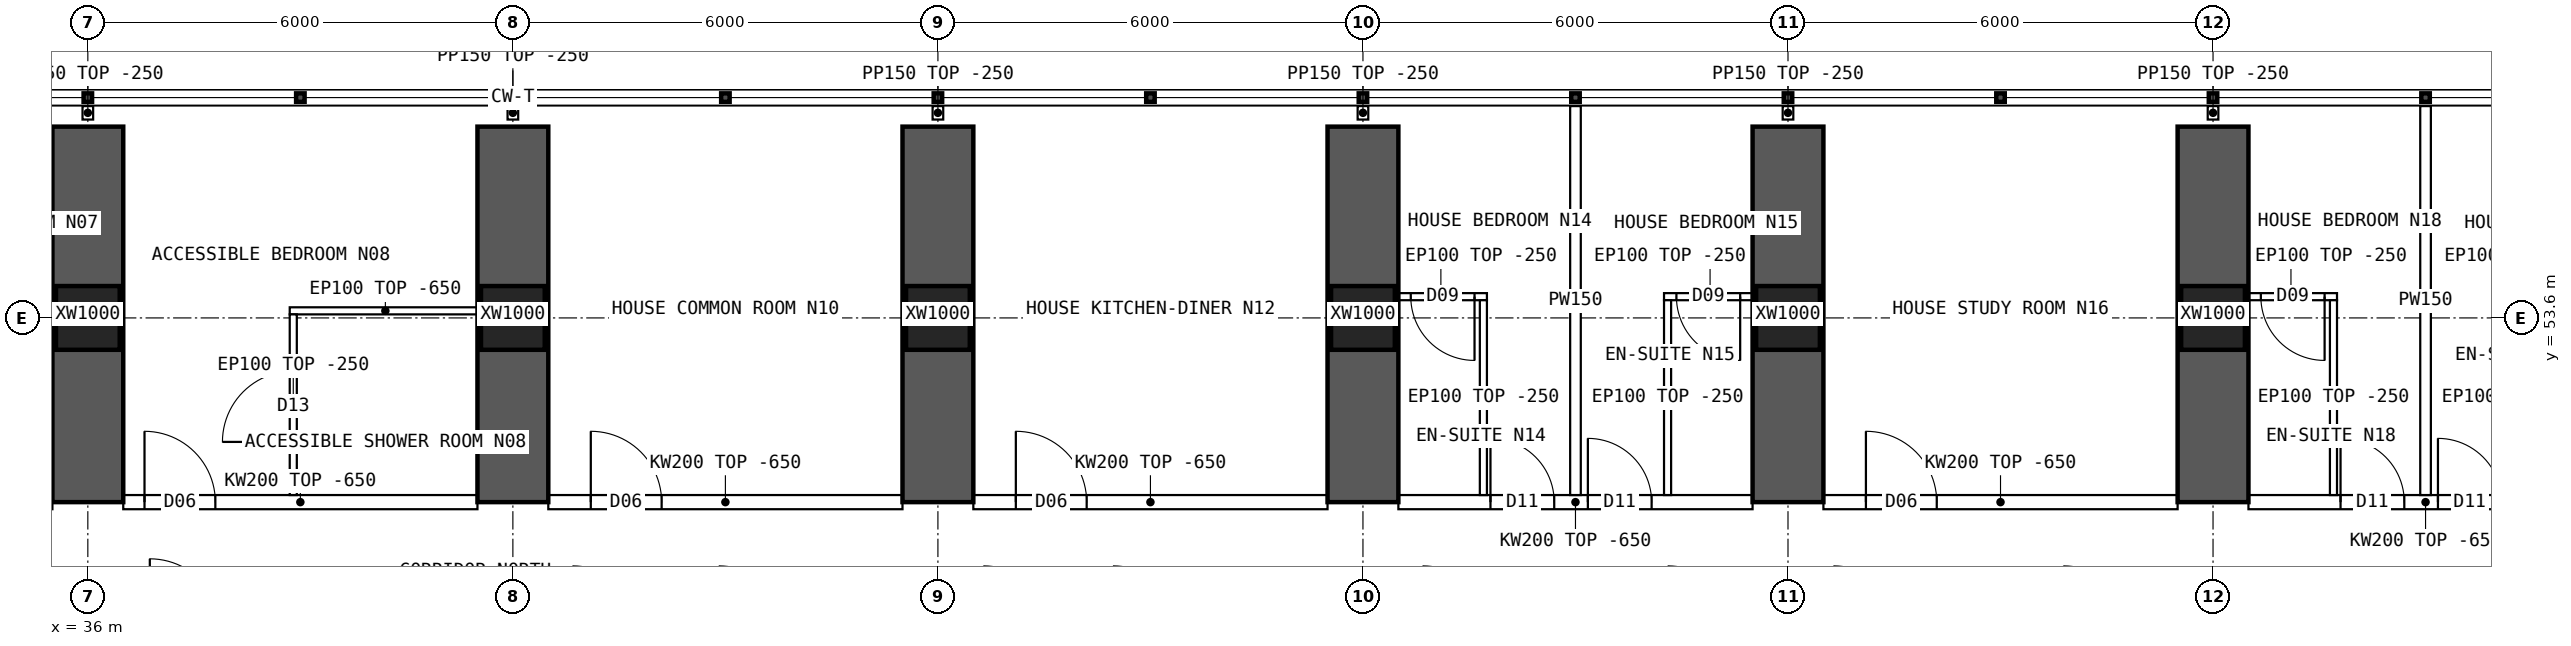
"""IFC4 building model, lengths in metres.
Left out: names, types, materials, properties, quantities, classifications, styles, units other than length and angle.
Written with IfcOpenShell. Run it as: python <this file> out.ifc"""

import sys

from ifc_helpers import new_model, si_unit, direction, frame, frame_2d, origin, origin_2d, place, context, subcontext, project, spatial, polyline, rectangle, hollow_rectangle, outline, extrude, element, fill, save


model = new_model("IFC4")
c1 = context("Model", 3, precision=1e-05, world=origin(), true_north=direction((0.0, 1.0)))
c2 = subcontext(c1, "Body", "Model", "MODEL_VIEW")
j1 = project(units=[si_unit("LENGTHUNIT", "METRE"), si_unit("PLANEANGLEUNIT", "RADIAN")], contexts=[c1])
p1 = place(None, origin())
s1 = spatial("IfcSite", under=j1, at=p1, CompositionType="ELEMENT")
p2 = place(p1, origin())
s2 = spatial("IfcBuilding", under=s1, at=p2, CompositionType="ELEMENT")
p3 = place(p2, frame((0.0, 0.0, 42.7)))
s3 = spatial("IfcBuildingStorey", under=s2, at=p3, CompositionType="ELEMENT", Elevation=42.7)
for number, where, z_axis, x_axis in (
    (1, (36.0, 53.6, 0.0), (0.0, 0.0, 1.0), (1.0, 0.0, 0.0)),
    (2, (42.0, 53.6, 0.0), (0.0, 0.0, 1.0), (1.0, 0.0, 0.0)),
    (3, (48.0, 53.6, 0.0), (0.0, 0.0, 1.0), (1.0, 0.0, 0.0)),
    (4, (54.0, 53.6, 0.0), (0.0, 0.0, 1.0), (1.0, 0.0, 0.0)),
    (5, (60.0, 53.6, 0.0), (0.0, 0.0, 1.0), (1.0, 0.0, 0.0)),
    (6, (66.0, 53.6, 0.0), (0.0, 0.0, 1.0), (1.0, 0.0, 0.0)),
):
    element("IfcColumn", number, at=place(p3, frame(where, z_axis=z_axis, x_axis=x_axis)), inside=s3, PredefinedType="COLUMN", context=c2, shape_type="SweptSolid", body=[
        extrude(hollow_rectangle(XDim=0.9, YDim=0.9, WallThickness=0.09, at=origin_2d()), origin(), (0.0, 0.0, 1.0), 3.75),
    ])
for number, where, z_axis, x_axis in (
    (7, (36.0, 51.0, 0.0), (0.0, 0.0, 1.0), (0.0, 1.0, 0.0)),
    (8, (42.0, 51.0, 0.0), (0.0, 0.0, 1.0), (0.0, 1.0, 0.0)),
    (9, (48.0, 51.0, 0.0), (0.0, 0.0, 1.0), (0.0, 1.0, 0.0)),
    (10, (54.0, 51.0, 0.0), (0.0, 0.0, 1.0), (0.0, 1.0, 0.0)),
    (11, (60.0, 51.0, 0.0), (0.0, 0.0, 1.0), (0.0, 1.0, 0.0)),
    (12, (66.0, 51.0, 0.0), (0.0, 0.0, 1.0), (0.0, 1.0, 0.0)),
):
    element("IfcWall", number, at=place(p3, frame(where, z_axis=z_axis, x_axis=x_axis)), inside=s3, PredefinedType="SHEAR", context=c2, shape_type="SweptSolid", body=[
        extrude(rectangle(XDim=5.3, YDim=1.0, at=frame_2d((2.65, 0.0))), origin(), (0.0, 0.0, 1.0), 3.75),
    ])
p4 = place(p3, frame((36.5, 51.0, 0.0), z_axis=(0.0, 0.0, 1.0), x_axis=(1.0, 0.0, 0.0)))
e13 = element("IfcWall", 13, at=p4, inside=s3, PredefinedType="SOLIDWALL", context=c2, shape_type="SweptSolid", body=[
    extrude(outline(polyline([(0.0, 0.0), (5.0, 0.0), (5.0, 3.1), (0.0, 3.1), (0.0, 0.0)])), frame((0.0, 0.1, 0.0), z_axis=(0.0, -1.0, 0.0), x_axis=(1.0, 0.0, 0.0)), (0.0, 0.0, 1.0), 0.2),
])
p5 = place(p4, frame((0.3, 0.0, 0.0)))
e14 = element("IfcOpeningElement", 14, at=p5, cuts=e13, PredefinedType="OPENING", context=c2, shape_type="SweptSolid", body=[
    extrude(rectangle(XDim=1.0, YDim=2.1, at=frame_2d((0.5, 1.05))), frame((0.0, 0.11, 0.0), z_axis=(0.0, -1.0, 0.0), x_axis=(1.0, 0.0, 0.0)), (0.0, 0.0, 1.0), 0.22),
])
p6 = place(p3, frame((42.5, 51.0, 0.0), z_axis=(0.0, 0.0, 1.0), x_axis=(1.0, 0.0, 0.0)))
e15 = element("IfcWall", 15, at=p6, inside=s3, PredefinedType="SOLIDWALL", context=c2, shape_type="SweptSolid", body=[
    extrude(outline(polyline([(0.0, 0.0), (5.0, 0.0), (5.0, 3.1), (0.0, 3.1), (0.0, 0.0)])), frame((0.0, 0.1, 0.0), z_axis=(0.0, -1.0, 0.0), x_axis=(1.0, 0.0, 0.0)), (0.0, 0.0, 1.0), 0.2),
])
p7 = place(p6, frame((0.6, 0.0, 0.0)))
e16 = element("IfcOpeningElement", 16, at=p7, cuts=e15, PredefinedType="OPENING", context=c2, shape_type="SweptSolid", body=[
    extrude(rectangle(XDim=1.0, YDim=2.1, at=frame_2d((0.5, 1.05))), frame((0.0, 0.11, 0.0), z_axis=(0.0, -1.0, 0.0), x_axis=(1.0, 0.0, 0.0)), (0.0, 0.0, 1.0), 0.22),
])
p8 = place(p3, frame((48.5, 51.0, 0.0), z_axis=(0.0, 0.0, 1.0), x_axis=(1.0, 0.0, 0.0)))
e17 = element("IfcWall", 17, at=p8, inside=s3, PredefinedType="SOLIDWALL", context=c2, shape_type="SweptSolid", body=[
    extrude(outline(polyline([(0.0, 0.0), (5.0, 0.0), (5.0, 3.1), (0.0, 3.1), (0.0, 0.0)])), frame((0.0, 0.1, 0.0), z_axis=(0.0, -1.0, 0.0), x_axis=(1.0, 0.0, 0.0)), (0.0, 0.0, 1.0), 0.2),
])
p9 = place(p8, frame((0.6, 0.0, 0.0)))
e18 = element("IfcOpeningElement", 18, at=p9, cuts=e17, PredefinedType="OPENING", context=c2, shape_type="SweptSolid", body=[
    extrude(rectangle(XDim=1.0, YDim=2.1, at=frame_2d((0.5, 1.05))), frame((0.0, 0.11, 0.0), z_axis=(0.0, -1.0, 0.0), x_axis=(1.0, 0.0, 0.0)), (0.0, 0.0, 1.0), 0.22),
])
p10 = place(p3, frame((54.5, 51.0, 0.0), z_axis=(0.0, 0.0, 1.0), x_axis=(1.0, 0.0, 0.0)))
e19 = element("IfcWall", 19, at=p10, inside=s3, PredefinedType="SOLIDWALL", context=c2, shape_type="SweptSolid", body=[
    extrude(outline(polyline([(0.0, 0.0), (5.0, 0.0), (5.0, 3.1), (0.0, 3.1), (0.0, 0.0)])), frame((0.0, 0.1, 0.0), z_axis=(0.0, -1.0, 0.0), x_axis=(1.0, 0.0, 0.0)), (0.0, 0.0, 1.0), 0.2),
])
p11 = place(p10, frame((1.3, 0.0, 0.0)))
e20 = element("IfcOpeningElement", 20, at=p11, cuts=e19, PredefinedType="OPENING", context=c2, shape_type="SweptSolid", body=[
    extrude(rectangle(XDim=0.9, YDim=2.1, at=frame_2d((0.45, 1.05))), frame((0.0, 0.11, 0.0), z_axis=(0.0, -1.0, 0.0), x_axis=(1.0, 0.0, 0.0)), (0.0, 0.0, 1.0), 0.22),
])
p12 = place(p10, frame((2.675, 0.0, 0.0)))
e21 = element("IfcOpeningElement", 21, at=p12, cuts=e19, PredefinedType="OPENING", context=c2, shape_type="SweptSolid", body=[
    extrude(rectangle(XDim=0.9, YDim=2.1, at=frame_2d((0.45, 1.05))), frame((0.0, 0.11, 0.0), z_axis=(0.0, -1.0, 0.0), x_axis=(1.0, 0.0, 0.0)), (0.0, 0.0, 1.0), 0.22),
])
p13 = place(p3, frame((60.5, 51.0, 0.0), z_axis=(0.0, 0.0, 1.0), x_axis=(1.0, 0.0, 0.0)))
e22 = element("IfcWall", 22, at=p13, inside=s3, PredefinedType="SOLIDWALL", context=c2, shape_type="SweptSolid", body=[
    extrude(outline(polyline([(0.0, 0.0), (5.0, 0.0), (5.0, 3.1), (0.0, 3.1), (0.0, 0.0)])), frame((0.0, 0.1, 0.0), z_axis=(0.0, -1.0, 0.0), x_axis=(1.0, 0.0, 0.0)), (0.0, 0.0, 1.0), 0.2),
])
p14 = place(p13, frame((0.6, 0.0, 0.0)))
e23 = element("IfcOpeningElement", 23, at=p14, cuts=e22, PredefinedType="OPENING", context=c2, shape_type="SweptSolid", body=[
    extrude(rectangle(XDim=1.0, YDim=2.1, at=frame_2d((0.5, 1.05))), frame((0.0, 0.11, 0.0), z_axis=(0.0, -1.0, 0.0), x_axis=(1.0, 0.0, 0.0)), (0.0, 0.0, 1.0), 0.22),
])
p15 = place(p3, frame((66.5, 51.0, 0.0), z_axis=(0.0, 0.0, 1.0), x_axis=(1.0, 0.0, 0.0)))
e24 = element("IfcWall", 24, at=p15, inside=s3, PredefinedType="SOLIDWALL", context=c2, shape_type="SweptSolid", body=[
    extrude(outline(polyline([(0.0, 0.0), (5.0, 0.0), (5.0, 3.1), (0.0, 3.1), (0.0, 0.0)])), frame((0.0, 0.1, 0.0), z_axis=(0.0, -1.0, 0.0), x_axis=(1.0, 0.0, 0.0)), (0.0, 0.0, 1.0), 0.2),
])
p16 = place(p15, frame((1.3, 0.0, 0.0)))
e25 = element("IfcOpeningElement", 25, at=p16, cuts=e24, PredefinedType="OPENING", context=c2, shape_type="SweptSolid", body=[
    extrude(rectangle(XDim=0.9, YDim=2.1, at=frame_2d((0.45, 1.05))), frame((0.0, 0.11, 0.0), z_axis=(0.0, -1.0, 0.0), x_axis=(1.0, 0.0, 0.0)), (0.0, 0.0, 1.0), 0.22),
])
p17 = place(p15, frame((2.675, 0.0, 0.0)))
e26 = element("IfcOpeningElement", 26, at=p17, cuts=e24, PredefinedType="OPENING", context=c2, shape_type="SweptSolid", body=[
    extrude(rectangle(XDim=0.9, YDim=2.1, at=frame_2d((0.45, 1.05))), frame((0.0, 0.11, 0.0), z_axis=(0.0, -1.0, 0.0), x_axis=(1.0, 0.0, 0.0)), (0.0, 0.0, 1.0), 0.22),
])
p18 = place(p3, frame((34.25, 53.9, 0.0), z_axis=(0.0, 0.0, 1.0), x_axis=(1.0, 0.0, 0.0)))
e27 = element("IfcWall", 27, at=p18, inside=s3, PredefinedType="PARTITIONING", context=c2, shape_type="SweptSolid", body=[
    extrude(rectangle(XDim=1.3, YDim=0.1, at=frame_2d((0.65, 0.0))), origin(), (0.0, 0.0, 1.0), 3.5),
])
p19 = place(p18, frame((0.175, 0.0, 0.0)))
e28 = element("IfcOpeningElement", 28, at=p19, cuts=e27, PredefinedType="OPENING", context=c2, shape_type="SweptSolid", body=[
    extrude(rectangle(XDim=0.9, YDim=2.1, at=frame_2d((0.45, 1.05))), frame((0.0, 0.06, 0.0), z_axis=(0.0, -1.0, 0.0), x_axis=(1.0, 0.0, 0.0)), (0.0, 0.0, 1.0), 0.12),
])
p20 = place(p3, frame((38.85, 53.7, 0.0), z_axis=(0.0, 0.0, 1.0), x_axis=(1.0, 0.0, 0.0)))
e29 = element("IfcWall", 29, at=p20, inside=s3, PredefinedType="PARTITIONING", context=c2, shape_type="SweptSolid", body=[
    extrude(outline(polyline([(0.0, 0.0), (2.7, 0.0), (2.7, 3.1), (0.0, 3.1), (0.0, 0.0)])), frame((0.0, 0.05, 0.0), z_axis=(0.0, -1.0, 0.0), x_axis=(1.0, 0.0, 0.0)), (0.0, 0.0, 1.0), 0.1),
])
p21 = place(p3, frame((38.9, 53.65, 0.0), z_axis=(0.0, 0.0, 1.0), x_axis=(0.0, -1.0, 0.0)))
e30 = element("IfcWall", 30, at=p21, inside=s3, PredefinedType="PARTITIONING", context=c2, shape_type="SweptSolid", body=[
    extrude(outline(polyline([(0.0, 0.0), (2.55, 0.0), (2.55, 3.1), (2.502, 3.1), (2.5, 3.5), (0.252, 3.5), (0.25, 3.1), (0.0, 3.1), (0.0, 0.0)])), frame((0.0, 0.05, 0.0), z_axis=(0.0, -1.0, 0.0), x_axis=(1.0, 0.0, 0.0)), (0.0, 0.0, 1.0), 0.1),
])
p22 = place(p21, frame((0.8, 0.0, 0.0)))
e31 = element("IfcOpeningElement", 31, at=p22, cuts=e30, PredefinedType="OPENING", context=c2, shape_type="SweptSolid", body=[
    extrude(rectangle(XDim=1.0, YDim=2.1, at=frame_2d((0.5, 1.05))), frame((0.0, 0.06, 0.0), z_axis=(0.0, -1.0, 0.0), x_axis=(1.0, 0.0, 0.0)), (0.0, 0.0, 1.0), 0.12),
])
p23 = place(p3, frame((57.0, 56.59, 0.0), z_axis=(0.0, 0.0, 1.0), x_axis=(0.0, -1.0, 0.0)))
e32 = element("IfcWall", 32, at=p23, inside=s3, PredefinedType="PARTITIONING", context=c2, shape_type="SweptSolid", body=[
    extrude(outline(polyline([(0.0, 0.0), (5.49, 0.0), (5.49, 3.1), (5.442, 3.1), (5.44, 3.5), (3.192, 3.5), (3.19, 3.1), (2.792, 3.1), (2.79, 3.5), (0.0, 3.5), (0.0, 0.0)])), frame((0.0, 0.075, 0.0), z_axis=(0.0, -1.0, 0.0), x_axis=(1.0, 0.0, 0.0)), (0.0, 0.0, 1.0), 0.15),
])
p24 = place(p3, frame((54.45, 53.9, 0.0), z_axis=(0.0, 0.0, 1.0), x_axis=(1.0, 0.0, 0.0)))
e33 = element("IfcWall", 33, at=p24, inside=s3, PredefinedType="PARTITIONING", context=c2, shape_type="SweptSolid", body=[
    extrude(rectangle(XDim=1.3, YDim=0.1, at=frame_2d((0.65, 0.0))), origin(), (0.0, 0.0, 1.0), 3.5),
])
p25 = place(p24, frame((0.225, 0.0, 0.0)))
e34 = element("IfcOpeningElement", 34, at=p25, cuts=e33, PredefinedType="OPENING", context=c2, shape_type="SweptSolid", body=[
    extrude(rectangle(XDim=0.9, YDim=2.1, at=frame_2d((0.45, 1.05))), frame((0.0, 0.06, 0.0), z_axis=(0.0, -1.0, 0.0), x_axis=(1.0, 0.0, 0.0)), (0.0, 0.0, 1.0), 0.12),
])
p26 = place(p3, frame((55.7, 53.85, 0.0), z_axis=(0.0, 0.0, 1.0), x_axis=(0.0, -1.0, 0.0)))
e35 = element("IfcWall", 35, at=p26, inside=s3, PredefinedType="PARTITIONING", context=c2, shape_type="SweptSolid", body=[
    extrude(outline(polyline([(0.0, 0.0), (2.75, 0.0), (2.75, 3.1), (2.702, 3.1), (2.7, 3.5), (0.452, 3.5), (0.45, 3.1), (0.0, 3.1), (0.0, 0.0)])), frame((0.0, 0.05, 0.0), z_axis=(0.0, -1.0, 0.0), x_axis=(1.0, 0.0, 0.0)), (0.0, 0.0, 1.0), 0.1),
])
p27 = place(p3, frame((58.25, 53.9, 0.0), z_axis=(0.0, 0.0, 1.0), x_axis=(1.0, 0.0, 0.0)))
e36 = element("IfcWall", 36, at=p27, inside=s3, PredefinedType="PARTITIONING", context=c2, shape_type="SweptSolid", body=[
    extrude(rectangle(XDim=1.3, YDim=0.1, at=frame_2d((0.65, 0.0))), origin(), (0.0, 0.0, 1.0), 3.5),
])
p28 = place(p27, frame((0.175, 0.0, 0.0)))
e37 = element("IfcOpeningElement", 37, at=p28, cuts=e36, PredefinedType="OPENING", context=c2, shape_type="SweptSolid", body=[
    extrude(rectangle(XDim=0.9, YDim=2.1, at=frame_2d((0.45, 1.05))), frame((0.0, 0.06, 0.0), z_axis=(0.0, -1.0, 0.0), x_axis=(1.0, 0.0, 0.0)), (0.0, 0.0, 1.0), 0.12),
])
p29 = place(p3, frame((58.3, 53.85, 0.0), z_axis=(0.0, 0.0, 1.0), x_axis=(0.0, -1.0, 0.0)))
e38 = element("IfcWall", 38, at=p29, inside=s3, PredefinedType="PARTITIONING", context=c2, shape_type="SweptSolid", body=[
    extrude(outline(polyline([(0.0, 0.0), (2.75, 0.0), (2.75, 3.1), (2.702, 3.1), (2.7, 3.5), (0.452, 3.5), (0.45, 3.1), (0.0, 3.1), (0.0, 0.0)])), frame((0.0, 0.05, 0.0), z_axis=(0.0, -1.0, 0.0), x_axis=(1.0, 0.0, 0.0)), (0.0, 0.0, 1.0), 0.1),
])
p30 = place(p3, frame((69.0, 56.59, 0.0), z_axis=(0.0, 0.0, 1.0), x_axis=(0.0, -1.0, 0.0)))
e39 = element("IfcWall", 39, at=p30, inside=s3, PredefinedType="PARTITIONING", context=c2, shape_type="SweptSolid", body=[
    extrude(outline(polyline([(0.0, 0.0), (5.49, 0.0), (5.49, 3.1), (5.442, 3.1), (5.44, 3.5), (3.192, 3.5), (3.19, 3.1), (2.792, 3.1), (2.79, 3.5), (0.0, 3.5), (0.0, 0.0)])), frame((0.0, 0.075, 0.0), z_axis=(0.0, -1.0, 0.0), x_axis=(1.0, 0.0, 0.0)), (0.0, 0.0, 1.0), 0.15),
])
p31 = place(p3, frame((66.45, 53.9, 0.0), z_axis=(0.0, 0.0, 1.0), x_axis=(1.0, 0.0, 0.0)))
e40 = element("IfcWall", 40, at=p31, inside=s3, PredefinedType="PARTITIONING", context=c2, shape_type="SweptSolid", body=[
    extrude(rectangle(XDim=1.3, YDim=0.1, at=frame_2d((0.65, 0.0))), origin(), (0.0, 0.0, 1.0), 3.5),
])
p32 = place(p31, frame((0.225, 0.0, 0.0)))
e41 = element("IfcOpeningElement", 41, at=p32, cuts=e40, PredefinedType="OPENING", context=c2, shape_type="SweptSolid", body=[
    extrude(rectangle(XDim=0.9, YDim=2.1, at=frame_2d((0.45, 1.05))), frame((0.0, 0.06, 0.0), z_axis=(0.0, -1.0, 0.0), x_axis=(1.0, 0.0, 0.0)), (0.0, 0.0, 1.0), 0.12),
])
p33 = place(p3, frame((67.7, 53.85, 0.0), z_axis=(0.0, 0.0, 1.0), x_axis=(0.0, -1.0, 0.0)))
e42 = element("IfcWall", 42, at=p33, inside=s3, PredefinedType="PARTITIONING", context=c2, shape_type="SweptSolid", body=[
    extrude(outline(polyline([(0.0, 0.0), (2.75, 0.0), (2.75, 3.1), (2.702, 3.1), (2.7, 3.5), (0.452, 3.5), (0.45, 3.1), (0.0, 3.1), (0.0, 0.0)])), frame((0.0, 0.05, 0.0), z_axis=(0.0, -1.0, 0.0), x_axis=(1.0, 0.0, 0.0)), (0.0, 0.0, 1.0), 0.1),
])
for number, where, z_axis, x_axis in (
    (43, (36.0, 56.4, 0.0), (0.0, 0.0, 1.0), (0.0, 1.0, 0.0)),
    (44, (42.0, 56.4, 0.0), (0.0, 0.0, 1.0), (0.0, 1.0, 0.0)),
    (45, (48.0, 56.4, 0.0), (0.0, 0.0, 1.0), (0.0, 1.0, 0.0)),
    (46, (54.0, 56.4, 0.0), (0.0, 0.0, 1.0), (0.0, 1.0, 0.0)),
    (47, (60.0, 56.4, 0.0), (0.0, 0.0, 1.0), (0.0, 1.0, 0.0)),
    (48, (66.0, 56.4, 0.0), (0.0, 0.0, 1.0), (0.0, 1.0, 0.0)),
):
    element("IfcWall", number, at=place(p3, frame(where, z_axis=z_axis, x_axis=x_axis)), inside=s3, PredefinedType="PARTITIONING", context=c2, shape_type="SweptSolid", body=[
        extrude(rectangle(XDim=0.19, YDim=0.15, at=frame_2d((0.095, 0.0))), origin(), (0.0, 0.0, 1.0), 3.5),
    ])
p34 = place(p22, origin())
e49 = element("IfcDoor", 49, at=p34, inside=s3, OperationType="SINGLE_SWING_RIGHT", PredefinedType="DOOR", context=c2, shape_type="SweptSolid", body=[
    extrude(rectangle(XDim=1.0, YDim=2.1, at=frame_2d((0.5, 1.05))), frame((0.0, 0.025, 0.0), z_axis=(0.0, -1.0, 0.0), x_axis=(1.0, 0.0, 0.0)), (0.0, 0.0, 1.0), 0.05),
])
fill(e31, e49)
p35 = place(p5, origin())
e50 = element("IfcDoor", 50, at=p35, inside=s3, OperationType="SINGLE_SWING_LEFT", PredefinedType="DOOR", context=c2, shape_type="SweptSolid", body=[
    extrude(rectangle(XDim=1.0, YDim=2.1, at=frame_2d((0.5, 1.05))), frame((0.0, 0.025, 0.0), z_axis=(0.0, -1.0, 0.0), x_axis=(1.0, 0.0, 0.0)), (0.0, 0.0, 1.0), 0.05),
])
fill(e14, e50)
p36 = place(p7, origin())
e51 = element("IfcDoor", 51, at=p36, inside=s3, OperationType="SINGLE_SWING_LEFT", PredefinedType="DOOR", context=c2, shape_type="SweptSolid", body=[
    extrude(rectangle(XDim=1.0, YDim=2.1, at=frame_2d((0.5, 1.05))), frame((0.0, 0.025, 0.0), z_axis=(0.0, -1.0, 0.0), x_axis=(1.0, 0.0, 0.0)), (0.0, 0.0, 1.0), 0.05),
])
fill(e16, e51)
p37 = place(p9, origin())
e52 = element("IfcDoor", 52, at=p37, inside=s3, OperationType="SINGLE_SWING_LEFT", PredefinedType="DOOR", context=c2, shape_type="SweptSolid", body=[
    extrude(rectangle(XDim=1.0, YDim=2.1, at=frame_2d((0.5, 1.05))), frame((0.0, 0.025, 0.0), z_axis=(0.0, -1.0, 0.0), x_axis=(1.0, 0.0, 0.0)), (0.0, 0.0, 1.0), 0.05),
])
fill(e18, e52)
p38 = place(p25, origin())
e53 = element("IfcDoor", 53, at=p38, inside=s3, OperationType="SINGLE_SWING_RIGHT", PredefinedType="DOOR", context=c2, shape_type="SweptSolid", body=[
    extrude(rectangle(XDim=0.9, YDim=2.1, at=frame_2d((0.45, 1.05))), frame((0.0, 0.025, 0.0), z_axis=(0.0, -1.0, 0.0), x_axis=(1.0, 0.0, 0.0)), (0.0, 0.0, 1.0), 0.05),
])
fill(e34, e53)
p39 = place(p11, origin())
e54 = element("IfcDoor", 54, at=p39, inside=s3, OperationType="SINGLE_SWING_LEFT", PredefinedType="DOOR", context=c2, shape_type="SweptSolid", body=[
    extrude(rectangle(XDim=0.9, YDim=2.1, at=frame_2d((0.45, 1.05))), frame((0.0, 0.025, 0.0), z_axis=(0.0, -1.0, 0.0), x_axis=(1.0, 0.0, 0.0)), (0.0, 0.0, 1.0), 0.05),
])
fill(e20, e54)
p40 = place(p28, origin())
e55 = element("IfcDoor", 55, at=p40, inside=s3, OperationType="SINGLE_SWING_RIGHT", PredefinedType="DOOR", context=c2, shape_type="SweptSolid", body=[
    extrude(rectangle(XDim=0.9, YDim=2.1, at=frame_2d((0.45, 1.05))), frame((0.0, 0.025, 0.0), z_axis=(0.0, -1.0, 0.0), x_axis=(1.0, 0.0, 0.0)), (0.0, 0.0, 1.0), 0.05),
])
fill(e37, e55)
p41 = place(p12, origin())
e56 = element("IfcDoor", 56, at=p41, inside=s3, OperationType="SINGLE_SWING_LEFT", PredefinedType="DOOR", context=c2, shape_type="SweptSolid", body=[
    extrude(rectangle(XDim=0.9, YDim=2.1, at=frame_2d((0.45, 1.05))), frame((0.0, 0.025, 0.0), z_axis=(0.0, -1.0, 0.0), x_axis=(1.0, 0.0, 0.0)), (0.0, 0.0, 1.0), 0.05),
])
fill(e21, e56)
p42 = place(p14, origin())
e57 = element("IfcDoor", 57, at=p42, inside=s3, OperationType="SINGLE_SWING_LEFT", PredefinedType="DOOR", context=c2, shape_type="SweptSolid", body=[
    extrude(rectangle(XDim=1.0, YDim=2.1, at=frame_2d((0.5, 1.05))), frame((0.0, 0.025, 0.0), z_axis=(0.0, -1.0, 0.0), x_axis=(1.0, 0.0, 0.0)), (0.0, 0.0, 1.0), 0.05),
])
fill(e23, e57)
p43 = place(p32, origin())
e58 = element("IfcDoor", 58, at=p43, inside=s3, OperationType="SINGLE_SWING_RIGHT", PredefinedType="DOOR", context=c2, shape_type="SweptSolid", body=[
    extrude(rectangle(XDim=0.9, YDim=2.1, at=frame_2d((0.45, 1.05))), frame((0.0, 0.025, 0.0), z_axis=(0.0, -1.0, 0.0), x_axis=(1.0, 0.0, 0.0)), (0.0, 0.0, 1.0), 0.05),
])
fill(e41, e58)
p44 = place(p16, origin())
e59 = element("IfcDoor", 59, at=p44, inside=s3, OperationType="SINGLE_SWING_LEFT", PredefinedType="DOOR", context=c2, shape_type="SweptSolid", body=[
    extrude(rectangle(XDim=0.9, YDim=2.1, at=frame_2d((0.45, 1.05))), frame((0.0, 0.025, 0.0), z_axis=(0.0, -1.0, 0.0), x_axis=(1.0, 0.0, 0.0)), (0.0, 0.0, 1.0), 0.05),
])
fill(e25, e59)
p45 = place(p17, origin())
e60 = element("IfcDoor", 60, at=p45, inside=s3, OperationType="SINGLE_SWING_LEFT", PredefinedType="DOOR", context=c2, shape_type="SweptSolid", body=[
    extrude(rectangle(XDim=0.9, YDim=2.1, at=frame_2d((0.45, 1.05))), frame((0.0, 0.025, 0.0), z_axis=(0.0, -1.0, 0.0), x_axis=(1.0, 0.0, 0.0)), (0.0, 0.0, 1.0), 0.05),
])
fill(e26, e60)
save(model, sys.argv[1])
